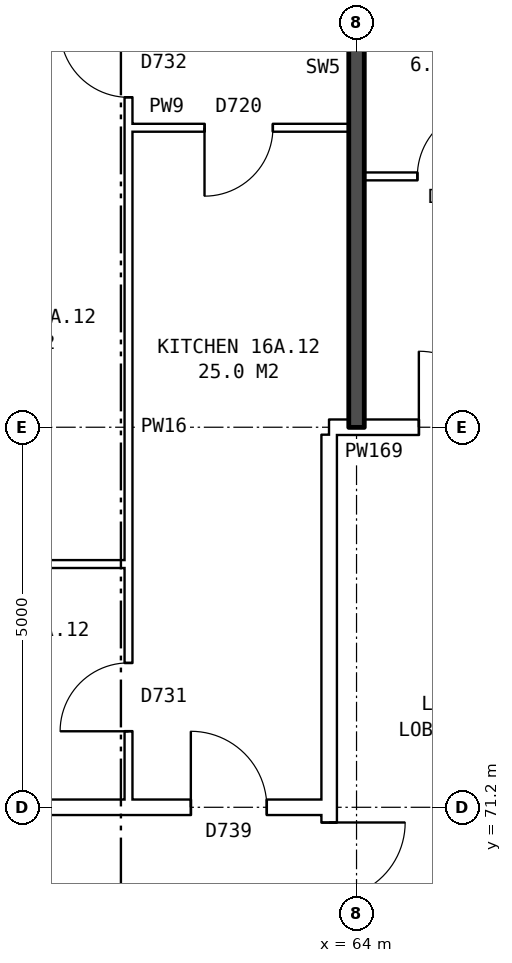
"""IFC4 building model, lengths in metres.
Left out: names, types, materials, properties, quantities, classifications, styles, units other than length and angle.
Written with IfcOpenShell. Run it as: python <this file> out.ifc"""

import sys

from ifc_helpers import new_model, si_unit, direction, frame, frame_2d, origin, place, context, subcontext, project, spatial, rectangle, extrude, element, fill, save


model = new_model("IFC4")
c1 = context("Model", 3, precision=1e-05, world=origin(), true_north=direction((0.0, 1.0)))
c2 = subcontext(c1, "Body", "Model", "MODEL_VIEW")
j1 = project(units=[si_unit("LENGTHUNIT", "METRE"), si_unit("PLANEANGLEUNIT", "RADIAN")], contexts=[c1])
p1 = place(None, origin())
s1 = spatial("IfcSite", under=j1, at=p1, CompositionType="ELEMENT")
p2 = place(p1, origin())
s2 = spatial("IfcBuilding", under=s1, at=p2, CompositionType="ELEMENT")
p3 = place(p2, frame((0.0, 0.0, 59.8)))
s3 = spatial("IfcBuildingStorey", under=s2, at=p3, CompositionType="ELEMENT", Elevation=59.8)
p4 = place(p3, frame((63.64, 63.9, 0.0), z_axis=(0.0, 0.0, 1.0), x_axis=(0.0, 1.0, 0.0)))
e1 = element("IfcWall", 1, at=p4, inside=s3, PredefinedType="PARTITIONING", context=c2, shape_type="SweptSolid", body=[
    extrude(rectangle(XDim=12.2, YDim=0.2, at=frame_2d((6.1, 0.0))), origin(), (0.0, 0.0, 1.0), 2.85),
])
p5 = place(p4, frame((5.1, 0.0, 0.0)))
e2 = element("IfcOpeningElement", 2, at=p5, cuts=e1, PredefinedType="OPENING", context=c2, shape_type="SweptSolid", body=[
    extrude(rectangle(XDim=2.0, YDim=2.1, at=frame_2d((1.0, 1.05))), frame((0.0, 0.11, 0.0), z_axis=(0.0, -1.0, 0.0), x_axis=(1.0, 0.0, 0.0)), (0.0, 0.0, 1.0), 0.22),
])
p6 = place(p3, frame((44.36, 71.2, 0.0), z_axis=(0.0, 0.0, 1.0), x_axis=(1.0, 0.0, 0.0)))
e3 = element("IfcWall", 3, at=p6, inside=s3, PredefinedType="PARTITIONING", context=c2, shape_type="SweptSolid", body=[
    extrude(rectangle(XDim=19.28, YDim=0.2, at=frame_2d((9.64, 0.0))), origin(), (0.0, 0.0, 1.0), 2.85),
])
p7 = place(p6, frame((17.46, 0.0, 0.0)))
e4 = element("IfcOpeningElement", 4, at=p7, cuts=e3, PredefinedType="OPENING", context=c2, shape_type="SweptSolid", body=[
    extrude(rectangle(XDim=1.0, YDim=2.1, at=frame_2d((0.5, 1.05))), frame((0.0, 0.11, 0.0), z_axis=(0.0, -1.0, 0.0), x_axis=(1.0, 0.0, 0.0)), (0.0, 0.0, 1.0), 0.22),
])
p8 = place(p6, frame((8.64, 0.0, 0.0)))
e5 = element("IfcOpeningElement", 5, at=p8, cuts=e3, PredefinedType="OPENING", context=c2, shape_type="SweptSolid", body=[
    extrude(rectangle(XDim=1.0, YDim=2.1, at=frame_2d((0.5, 1.05))), frame((0.0, 0.11, 0.0), z_axis=(0.0, -1.0, 0.0), x_axis=(1.0, 0.0, 0.0)), (0.0, 0.0, 1.0), 0.22),
])
p9 = place(p6, frame((5.64, 0.0, 0.0)))
e6 = element("IfcOpeningElement", 6, at=p9, cuts=e3, PredefinedType="OPENING", context=c2, shape_type="SweptSolid", body=[
    extrude(rectangle(XDim=1.0, YDim=2.1, at=frame_2d((0.5, 1.05))), frame((0.0, 0.11, 0.0), z_axis=(0.0, -1.0, 0.0), x_axis=(1.0, 0.0, 0.0)), (0.0, 0.0, 1.0), 0.22),
])
p10 = place(p3, frame((55.0, 74.4, 0.0), z_axis=(0.0, 0.0, 1.0), x_axis=(1.0, 0.0, 0.0)))
e7 = element("IfcWall", 7, at=p10, inside=s3, PredefinedType="PARTITIONING", context=c2, shape_type="SweptSolid", body=[
    extrude(rectangle(XDim=6.0, YDim=0.1, at=frame_2d((3.0, 0.0))), origin(), (0.0, 0.0, 1.0), 2.85),
])
p11 = place(p3, frame((63.64, 76.2, 0.0), z_axis=(0.0, 0.0, 1.0), x_axis=(1.0, 0.0, 0.0)))
e8 = element("IfcWall", 8, at=p11, inside=s3, PredefinedType="PARTITIONING", context=c2, shape_type="SweptSolid", body=[
    extrude(rectangle(XDim=3.0, YDim=0.2, at=frame_2d((1.5, 0.0))), origin(), (0.0, 0.0, 1.0), 2.85),
])
p12 = place(p11, frame((1.18, 0.0, 0.0)))
e9 = element("IfcOpeningElement", 9, at=p12, cuts=e8, PredefinedType="OPENING", context=c2, shape_type="SweptSolid", body=[
    extrude(rectangle(XDim=1.0, YDim=2.1, at=frame_2d((0.5, 1.05))), frame((0.0, 0.11, 0.0), z_axis=(0.0, -1.0, 0.0), x_axis=(1.0, 0.0, 0.0)), (0.0, 0.0, 1.0), 0.22),
])
p13 = place(p3, frame((64.1, 79.5, 0.0), z_axis=(0.0, 0.0, 1.0), x_axis=(1.0, 0.0, 0.0)))
e10 = element("IfcWall", 10, at=p13, inside=s3, PredefinedType="PARTITIONING", context=c2, shape_type="SweptSolid", body=[
    extrude(rectangle(XDim=5.8, YDim=0.1, at=frame_2d((2.9, 0.0))), origin(), (0.0, 0.0, 1.0), 2.85),
])
p14 = place(p13, frame((3.6, 0.0, 0.0)))
e11 = element("IfcOpeningElement", 11, at=p14, cuts=e10, PredefinedType="OPENING", context=c2, shape_type="SweptSolid", body=[
    extrude(rectangle(XDim=0.9, YDim=2.1, at=frame_2d((0.45, 1.05))), frame((0.0, 0.06, 0.0), z_axis=(0.0, -1.0, 0.0), x_axis=(1.0, 0.0, 0.0)), (0.0, 0.0, 1.0), 0.12),
])
p15 = place(p13, frame((0.7, 0.0, 0.0)))
e12 = element("IfcOpeningElement", 12, at=p15, cuts=e10, PredefinedType="OPENING", context=c2, shape_type="SweptSolid", body=[
    extrude(rectangle(XDim=0.9, YDim=2.1, at=frame_2d((0.45, 1.05))), frame((0.0, 0.06, 0.0), z_axis=(0.0, -1.0, 0.0), x_axis=(1.0, 0.0, 0.0)), (0.0, 0.0, 1.0), 0.12),
])
p16 = place(p3, frame((61.0, 80.14, 0.0), z_axis=(0.0, 0.0, 1.0), x_axis=(1.0, 0.0, 0.0)))
e13 = element("IfcWall", 13, at=p16, inside=s3, PredefinedType="PARTITIONING", context=c2, shape_type="SweptSolid", body=[
    extrude(rectangle(XDim=2.9, YDim=0.1, at=frame_2d((1.45, 0.0))), origin(), (0.0, 0.0, 1.0), 2.85),
])
p17 = place(p16, frame((1.0, 0.0, 0.0)))
e14 = element("IfcOpeningElement", 14, at=p17, cuts=e13, PredefinedType="OPENING", context=c2, shape_type="SweptSolid", body=[
    extrude(rectangle(XDim=0.9, YDim=2.1, at=frame_2d((0.45, 1.05))), frame((0.0, 0.06, 0.0), z_axis=(0.0, -1.0, 0.0), x_axis=(1.0, 0.0, 0.0)), (0.0, 0.0, 1.0), 0.12),
])
p18 = place(p3, frame((61.0, 71.3, 0.0), z_axis=(0.0, 0.0, 1.0), x_axis=(0.0, 1.0, 0.0)))
e15 = element("IfcWall", 15, at=p18, inside=s3, PredefinedType="PARTITIONING", context=c2, shape_type="SweptSolid", body=[
    extrude(rectangle(XDim=14.34, YDim=0.1, at=frame_2d((7.17, 0.0))), origin(), (0.0, 0.0, 1.0), 2.85),
])
p19 = place(p18, frame((9.24, 0.0, 0.0)))
e16 = element("IfcOpeningElement", 16, at=p19, cuts=e15, PredefinedType="OPENING", context=c2, shape_type="SweptSolid", body=[
    extrude(rectangle(XDim=0.9, YDim=2.1, at=frame_2d((0.45, 1.05))), frame((0.0, 0.06, 0.0), z_axis=(0.0, -1.0, 0.0), x_axis=(1.0, 0.0, 0.0)), (0.0, 0.0, 1.0), 0.12),
])
p20 = place(p18, frame((0.9, 0.0, 0.0)))
e17 = element("IfcOpeningElement", 17, at=p20, cuts=e15, PredefinedType="OPENING", context=c2, shape_type="SweptSolid", body=[
    extrude(rectangle(XDim=0.9, YDim=2.1, at=frame_2d((0.45, 1.05))), frame((0.0, 0.06, 0.0), z_axis=(0.0, -1.0, 0.0), x_axis=(1.0, 0.0, 0.0)), (0.0, 0.0, 1.0), 0.12),
])
p21 = place(p3, frame((64.0, 76.2, 0.0), z_axis=(0.0, 0.0, 1.0), x_axis=(0.0, 1.0, 0.0)))
e18 = element("IfcWall", 18, at=p21, inside=s3, PredefinedType="SOLIDWALL", context=c2, shape_type="SweptSolid", body=[
    extrude(rectangle(XDim=9.44, YDim=0.2, at=frame_2d((4.72, 0.0))), origin(), (0.0, 0.0, 1.0), 2.85),
])
p22 = place(p5, frame((2.0, 0.0, 0.0), z_axis=(0.0, 0.0, 1.0), x_axis=(-1.0, 0.0, 0.0)))
e19 = element("IfcDoor", 19, at=p22, inside=s3, OperationType="DOUBLE_DOOR_SINGLE_SWING", PredefinedType="DOOR", context=c2, shape_type="SweptSolid", body=[
    extrude(rectangle(XDim=2.0, YDim=2.1, at=frame_2d((1.0, 1.05))), frame((0.0, 0.025, 0.0), z_axis=(0.0, -1.0, 0.0), x_axis=(1.0, 0.0, 0.0)), (0.0, 0.0, 1.0), 0.05),
])
fill(e2, e19)
p23 = place(p12, origin())
e20 = element("IfcDoor", 20, at=p23, inside=s3, OperationType="SINGLE_SWING_LEFT", PredefinedType="DOOR", context=c2, shape_type="SweptSolid", body=[
    extrude(rectangle(XDim=1.0, YDim=2.1, at=frame_2d((0.5, 1.05))), frame((0.0, 0.025, 0.0), z_axis=(0.0, -1.0, 0.0), x_axis=(1.0, 0.0, 0.0)), (0.0, 0.0, 1.0), 0.05),
])
fill(e9, e20)
p24 = place(p15, origin())
e21 = element("IfcDoor", 21, at=p24, inside=s3, OperationType="SINGLE_SWING_RIGHT", PredefinedType="DOOR", context=c2, shape_type="SweptSolid", body=[
    extrude(rectangle(XDim=0.9, YDim=2.1, at=frame_2d((0.45, 1.05))), frame((0.0, 0.025, 0.0), z_axis=(0.0, -1.0, 0.0), x_axis=(1.0, 0.0, 0.0)), (0.0, 0.0, 1.0), 0.05),
])
fill(e12, e21)
p25 = place(p19, origin())
e22 = element("IfcDoor", 22, at=p25, inside=s3, OperationType="SINGLE_SWING_RIGHT", PredefinedType="DOOR", context=c2, shape_type="SweptSolid", body=[
    extrude(rectangle(XDim=0.9, YDim=2.1, at=frame_2d((0.45, 1.05))), frame((0.0, 0.025, 0.0), z_axis=(0.0, -1.0, 0.0), x_axis=(1.0, 0.0, 0.0)), (0.0, 0.0, 1.0), 0.05),
])
fill(e16, e22)
p26 = place(p7, origin())
e23 = element("IfcDoor", 23, at=p26, inside=s3, OperationType="SINGLE_SWING_LEFT", PredefinedType="DOOR", context=c2, shape_type="SweptSolid", body=[
    extrude(rectangle(XDim=1.0, YDim=2.1, at=frame_2d((0.5, 1.05))), frame((0.0, 0.025, 0.0), z_axis=(0.0, -1.0, 0.0), x_axis=(1.0, 0.0, 0.0)), (0.0, 0.0, 1.0), 0.05),
])
fill(e4, e23)
p27 = place(p17, frame((0.9, 0.0, 0.0), z_axis=(0.0, 0.0, 1.0), x_axis=(-1.0, 0.0, 0.0)))
e24 = element("IfcDoor", 24, at=p27, inside=s3, OperationType="SINGLE_SWING_RIGHT", PredefinedType="DOOR", context=c2, shape_type="SweptSolid", body=[
    extrude(rectangle(XDim=0.9, YDim=2.1, at=frame_2d((0.45, 1.05))), frame((0.0, 0.025, 0.0), z_axis=(0.0, -1.0, 0.0), x_axis=(1.0, 0.0, 0.0)), (0.0, 0.0, 1.0), 0.05),
])
fill(e14, e24)
p28 = place(p20, origin())
e25 = element("IfcDoor", 25, at=p28, inside=s3, OperationType="SINGLE_SWING_LEFT", PredefinedType="DOOR", context=c2, shape_type="SweptSolid", body=[
    extrude(rectangle(XDim=0.9, YDim=2.1, at=frame_2d((0.45, 1.05))), frame((0.0, 0.025, 0.0), z_axis=(0.0, -1.0, 0.0), x_axis=(1.0, 0.0, 0.0)), (0.0, 0.0, 1.0), 0.05),
])
fill(e17, e25)
save(model, sys.argv[1])
